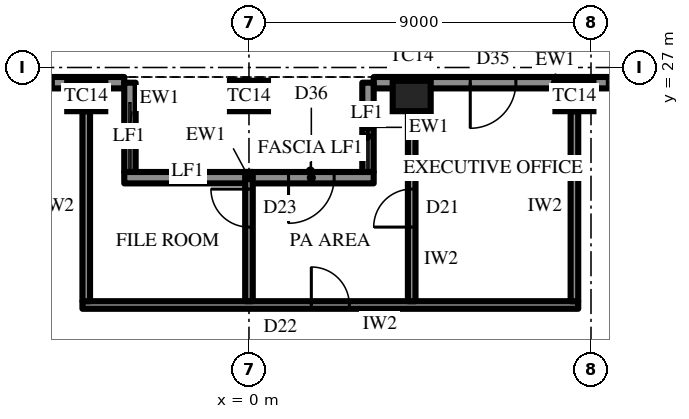
"""IFC4 building model, lengths in metres.
Left out: names, types, materials, properties, quantities, classifications, styles, units other than length and angle.
Written with IfcOpenShell. Run it as: python <this file> out.ifc"""

import sys

from ifc_helpers import new_model, si_unit, direction, frame, frame_2d, origin, origin_2d, place, context, subcontext, project, spatial, rectangle, extrude, element, fill, save


model = new_model("IFC4")
c1 = context("Model", 3, precision=1e-05, world=origin(), true_north=direction((0.0, 1.0)))
c2 = subcontext(c1, "Body", "Model", "MODEL_VIEW")
j1 = project(units=[si_unit("LENGTHUNIT", "METRE"), si_unit("PLANEANGLEUNIT", "RADIAN")], contexts=[c1])
p1 = place(None, origin())
s1 = spatial("IfcSite", under=j1, at=p1, CompositionType="ELEMENT")
p2 = place(p1, origin())
s2 = spatial("IfcBuilding", under=s1, at=p2, CompositionType="ELEMENT")
p3 = place(p2, frame((0.0, 0.0, 336.7)))
s3 = spatial("IfcBuildingStorey", under=s2, at=p3, CompositionType="ELEMENT", Elevation=336.7)
for number, where, z_axis, x_axis in (
    (1, (8.564, 26.25, 0.0), (0.0, 0.0, 1.0), (-1.0, 0.0, 0.0)),
    (2, (4.282, 26.25, 0.0), (0.0, 0.0, 1.0), (-1.0, 0.0, 0.0)),
    (3, (0.0, 26.25, 0.0), (0.0, 0.0, 1.0), (-1.0, 0.0, 0.0)),
    (4, (-4.282, 26.25, 0.0), (0.0, 0.0, 1.0), (-1.0, 0.0, 0.0)),
):
    element("IfcColumn", number, at=place(p3, frame(where, z_axis=z_axis, x_axis=x_axis)), inside=s3, PredefinedType="COLUMN", context=c2, shape_type="SweptSolid", body=[
        extrude(rectangle(XDim=1.0, YDim=0.8, at=origin_2d()), origin(), (0.0, 0.0, 1.0), 4.2),
    ])
p4 = place(p3, frame((12.846, 26.6, 0.0), z_axis=(0.0, 0.0, 1.0), x_axis=(-1.0, 0.0, 0.0)))
e5 = element("IfcWall", 5, at=p4, inside=s3, PredefinedType="SOLIDWALL", context=c2, shape_type="SweptSolid", body=[
    extrude(rectangle(XDim=9.564, YDim=0.3, at=frame_2d((4.782, 0.0))), origin(), (0.0, 0.0, 1.0), 2.9),
])
p5 = place(p4, frame((0.866, 0.0, 0.6)))
e6 = element("IfcOpeningElement", 6, at=p5, cuts=e5, PredefinedType="OPENING", context=c2, shape_type="SweptSolid", body=[
    extrude(rectangle(XDim=2.55, YDim=2.05, at=frame_2d((1.275, 1.025))), frame((0.0, 0.16, 0.0), z_axis=(0.0, -1.0, 0.0), x_axis=(1.0, 0.0, 0.0)), (0.0, 0.0, 1.0), 0.32),
])
p6 = place(p4, frame((5.823, 0.0, 0.0)))
e7 = element("IfcOpeningElement", 7, at=p6, cuts=e5, PredefinedType="OPENING", context=c2, shape_type="SweptSolid", body=[
    extrude(rectangle(XDim=1.2, YDim=2.4, at=frame_2d((0.6, 1.2))), frame((0.0, 0.16, 0.0), z_axis=(0.0, -1.0, 0.0), x_axis=(1.0, 0.0, 0.0)), (0.0, 0.0, 1.0), 0.32),
])
p7 = place(p3, frame((-3.282, 26.6, 0.0), z_axis=(0.0, 0.0, 1.0), x_axis=(-1.0, 0.0, 0.0)))
e8 = element("IfcWall", 8, at=p7, inside=s3, PredefinedType="SOLIDWALL", context=c2, shape_type="SweptSolid", body=[
    extrude(rectangle(XDim=9.564, YDim=0.3, at=frame_2d((4.782, 0.0))), origin(), (0.0, 0.0, 1.0), 2.9),
])
p8 = place(p7, frame((1.866, 0.0, 0.6)))
e9 = element("IfcOpeningElement", 9, at=p8, cuts=e8, PredefinedType="OPENING", context=c2, shape_type="SweptSolid", body=[
    extrude(rectangle(XDim=2.55, YDim=2.05, at=frame_2d((1.275, 1.025))), frame((0.0, 0.16, 0.0), z_axis=(0.0, -1.0, 0.0), x_axis=(1.0, 0.0, 0.0)), (0.0, 0.0, 1.0), 0.32),
])
p9 = place(p7, frame((6.148, 0.0, 0.6)))
e10 = element("IfcOpeningElement", 10, at=p9, cuts=e8, PredefinedType="OPENING", context=c2, shape_type="SweptSolid", body=[
    extrude(rectangle(XDim=2.55, YDim=2.05, at=frame_2d((1.275, 1.025))), frame((0.0, 0.16, 0.0), z_axis=(0.0, -1.0, 0.0), x_axis=(1.0, 0.0, 0.0)), (0.0, 0.0, 1.0), 0.32),
])
for number, where, z_axis, x_axis in (
    (11, (3.132, 26.6, 0.0), (0.0, 0.0, 1.0), (0.0, -1.0, 0.0)),
    (12, (-3.132, 26.6, 0.0), (0.0, 0.0, 1.0), (0.0, -1.0, 0.0)),
):
    element("IfcWall", number, at=place(p3, frame(where, z_axis=z_axis, x_axis=x_axis)), inside=s3, PredefinedType="SOLIDWALL", context=c2, shape_type="SweptSolid", body=[
        extrude(rectangle(XDim=2.35, YDim=0.3, at=frame_2d((1.175, 0.0))), origin(), (0.0, 0.0, 1.0), 2.9),
    ])
p10 = place(p3, frame((3.282, 24.1, 0.0), z_axis=(0.0, 0.0, 1.0), x_axis=(-1.0, 0.0, 0.0)))
e13 = element("IfcWall", 13, at=p10, inside=s3, PredefinedType="SOLIDWALL", context=c2, shape_type="SweptSolid", body=[
    extrude(rectangle(XDim=6.564, YDim=0.3, at=frame_2d((3.282, 0.0))), origin(), (0.0, 0.0, 1.0), 2.9),
])
p11 = place(p10, frame((1.041, 0.0, 0.0)))
e14 = element("IfcOpeningElement", 14, at=p11, cuts=e13, PredefinedType="OPENING", context=c2, shape_type="SweptSolid", body=[
    extrude(rectangle(XDim=1.2, YDim=2.4, at=frame_2d((0.6, 1.2))), frame((0.0, 0.16, 0.0), z_axis=(0.0, -1.0, 0.0), x_axis=(1.0, 0.0, 0.0)), (0.0, 0.0, 1.0), 0.32),
])
p12 = place(p3, frame((8.664, 20.75, 0.0), z_axis=(0.0, 0.0, 1.0), x_axis=(-1.0, 0.0, 0.0)))
e15 = element("IfcWall", 15, at=p12, inside=s3, PredefinedType="PARTITIONING", context=c2, shape_type="SweptSolid", body=[
    extrude(rectangle(XDim=13.046, YDim=0.2, at=frame_2d((6.523, 0.0))), origin(), (0.0, 0.0, 1.0), 4.0),
])
p13 = place(p12, frame((6.023, 0.0, 0.0)))
e16 = element("IfcOpeningElement", 16, at=p13, cuts=e15, PredefinedType="OPENING", context=c2, shape_type="SweptSolid", body=[
    extrude(rectangle(XDim=1.0, YDim=2.2, at=frame_2d((0.5, 1.1))), frame((0.0, 0.11, 0.0), z_axis=(0.0, -1.0, 0.0), x_axis=(1.0, 0.0, 0.0)), (0.0, 0.0, 1.0), 0.22),
])
p14 = place(p3, frame((8.564, 20.85, 0.0), z_axis=(0.0, 0.0, 1.0), x_axis=(0.0, 1.0, 0.0)))
e17 = element("IfcWall", 17, at=p14, inside=s3, PredefinedType="PARTITIONING", context=c2, shape_type="SweptSolid", body=[
    extrude(rectangle(XDim=5.0, YDim=0.2, at=frame_2d((2.5, 0.0))), origin(), (0.0, 0.0, 1.0), 2.992),
])
p15 = place(p3, frame((4.282, 20.85, 0.0), z_axis=(0.0, 0.0, 1.0), x_axis=(0.0, 1.0, 0.0)))
e18 = element("IfcWall", 18, at=p15, inside=s3, PredefinedType="PARTITIONING", context=c2, shape_type="SweptSolid", body=[
    extrude(rectangle(XDim=5.0, YDim=0.2, at=frame_2d((2.5, 0.0))), origin(), (0.0, 0.0, 1.0), 2.992),
])
p16 = place(p15, frame((1.95, 0.0, 0.0)))
e19 = element("IfcOpeningElement", 19, at=p16, cuts=e18, PredefinedType="OPENING", context=c2, shape_type="SweptSolid", body=[
    extrude(rectangle(XDim=1.0, YDim=2.2, at=frame_2d((0.5, 1.1))), frame((0.0, 0.11, 0.0), z_axis=(0.0, -1.0, 0.0), x_axis=(1.0, 0.0, 0.0)), (0.0, 0.0, 1.0), 0.22),
])
p17 = place(p3, frame((0.0, 20.85, 0.0), z_axis=(0.0, 0.0, 1.0), x_axis=(0.0, 1.0, 0.0)))
e20 = element("IfcWall", 20, at=p17, inside=s3, PredefinedType="PARTITIONING", context=c2, shape_type="SweptSolid", body=[
    extrude(rectangle(XDim=3.401, YDim=0.2, at=frame_2d((1.7, 0.0))), origin(), (0.0, 0.0, 1.0), 2.992),
])
p18 = place(p17, frame((1.95, 0.0, 0.0)))
e21 = element("IfcOpeningElement", 21, at=p18, cuts=e20, PredefinedType="OPENING", context=c2, shape_type="SweptSolid", body=[
    extrude(rectangle(XDim=1.0, YDim=2.2, at=frame_2d((0.5, 1.1))), frame((0.0, 0.11, 0.0), z_axis=(0.0, -1.0, 0.0), x_axis=(1.0, 0.0, 0.0)), (0.0, 0.0, 1.0), 0.22),
])
p19 = place(p3, frame((-4.282, 20.85, 0.0), z_axis=(0.0, 0.0, 1.0), x_axis=(0.0, 1.0, 0.0)))
e22 = element("IfcWall", 22, at=p19, inside=s3, PredefinedType="PARTITIONING", context=c2, shape_type="SweptSolid", body=[
    extrude(rectangle(XDim=5.0, YDim=0.2, at=frame_2d((2.5, 0.0))), origin(), (0.0, 0.0, 1.0), 2.992),
])
p20 = place(p5, origin())
e23 = element("IfcWindow", 23, at=p20, inside=s3, PartitioningType="SINGLE_PANEL", PredefinedType="WINDOW", context=c2, shape_type="SweptSolid", body=[
    extrude(rectangle(XDim=2.55, YDim=2.05, at=frame_2d((1.275, 1.025))), frame((0.0, 0.03, 0.0), z_axis=(0.0, -1.0, 0.0), x_axis=(1.0, 0.0, 0.0)), (0.0, 0.0, 1.0), 0.06),
])
fill(e6, e23)
p21 = place(p6, origin())
e24 = element("IfcDoor", 24, at=p21, inside=s3, OperationType="SINGLE_SWING_LEFT", PredefinedType="DOOR", context=c2, shape_type="SweptSolid", body=[
    extrude(rectangle(XDim=1.2, YDim=2.4, at=frame_2d((0.6, 1.2))), frame((0.0, 0.025, 0.0), z_axis=(0.0, -1.0, 0.0), x_axis=(1.0, 0.0, 0.0)), (0.0, 0.0, 1.0), 0.05),
])
fill(e7, e24)
p22 = place(p8, origin())
e25 = element("IfcWindow", 25, at=p22, inside=s3, PartitioningType="SINGLE_PANEL", PredefinedType="WINDOW", context=c2, shape_type="SweptSolid", body=[
    extrude(rectangle(XDim=2.55, YDim=2.05, at=frame_2d((1.275, 1.025))), frame((0.0, 0.03, 0.0), z_axis=(0.0, -1.0, 0.0), x_axis=(1.0, 0.0, 0.0)), (0.0, 0.0, 1.0), 0.06),
])
fill(e9, e25)
p23 = place(p11, origin())
e26 = element("IfcDoor", 26, at=p23, inside=s3, OperationType="SINGLE_SWING_LEFT", PredefinedType="DOOR", context=c2, shape_type="SweptSolid", body=[
    extrude(rectangle(XDim=1.2, YDim=2.4, at=frame_2d((0.6, 1.2))), frame((0.0, 0.025, 0.0), z_axis=(0.0, -1.0, 0.0), x_axis=(1.0, 0.0, 0.0)), (0.0, 0.0, 1.0), 0.05),
])
fill(e14, e26)
p24 = place(p16, origin())
e27 = element("IfcDoor", 27, at=p24, inside=s3, OperationType="SINGLE_SWING_RIGHT", PredefinedType="DOOR", context=c2, shape_type="SweptSolid", body=[
    extrude(rectangle(XDim=1.0, YDim=2.2, at=frame_2d((0.5, 1.1))), frame((0.0, 0.025, 0.0), z_axis=(0.0, -1.0, 0.0), x_axis=(1.0, 0.0, 0.0)), (0.0, 0.0, 1.0), 0.05),
])
fill(e19, e27)
p25 = place(p13, frame((1.0, 0.0, 0.0), z_axis=(0.0, 0.0, 1.0), x_axis=(-1.0, 0.0, 0.0)))
e28 = element("IfcDoor", 28, at=p25, inside=s3, OperationType="SINGLE_SWING_RIGHT", PredefinedType="DOOR", context=c2, shape_type="SweptSolid", body=[
    extrude(rectangle(XDim=1.0, YDim=2.2, at=frame_2d((0.5, 1.1))), frame((0.0, 0.025, 0.0), z_axis=(0.0, -1.0, 0.0), x_axis=(1.0, 0.0, 0.0)), (0.0, 0.0, 1.0), 0.05),
])
fill(e16, e28)
p26 = place(p18, origin())
e29 = element("IfcDoor", 29, at=p26, inside=s3, OperationType="SINGLE_SWING_LEFT", PredefinedType="DOOR", context=c2, shape_type="SweptSolid", body=[
    extrude(rectangle(XDim=1.0, YDim=2.2, at=frame_2d((0.5, 1.1))), frame((0.0, 0.025, 0.0), z_axis=(0.0, -1.0, 0.0), x_axis=(1.0, 0.0, 0.0)), (0.0, 0.0, 1.0), 0.05),
])
fill(e21, e29)
save(model, sys.argv[1])
